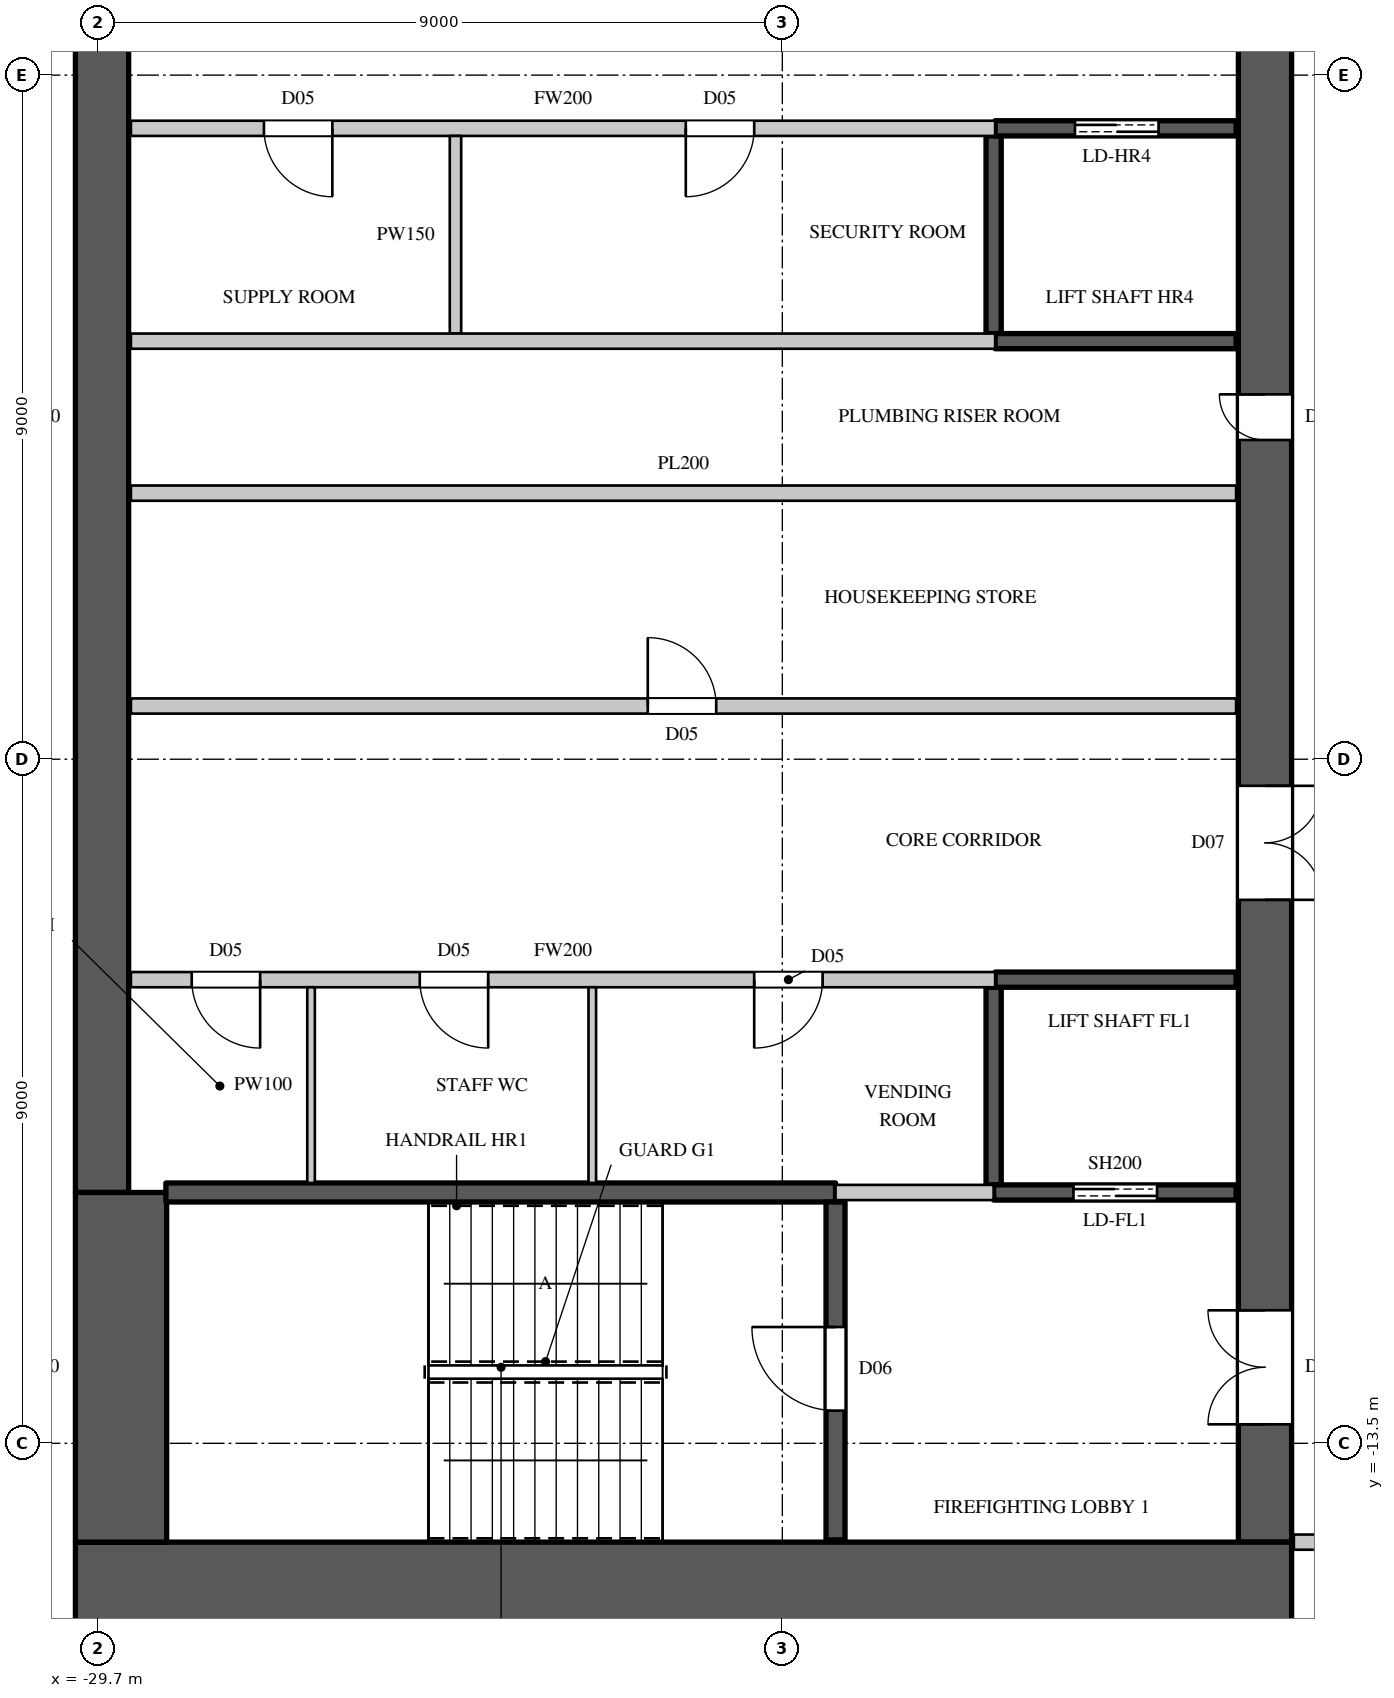
"""IFC4 building model, lengths in metres.
Left out: names, types, materials, properties, quantities, classifications, styles, units other than length and angle.
Written with IfcOpenShell. Run it as: python <this file> out.ifc"""

import sys

from ifc_helpers import new_model, si_unit, direction, frame, frame_2d, origin, place, context, subcontext, project, spatial, rectangle, extrude, element, fill, save


model = new_model("IFC4")
c1 = context("Model", 3, precision=1e-05, world=origin(), true_north=direction((0.0, 1.0)))
c2 = subcontext(c1, "Body", "Model", "MODEL_VIEW")
j1 = project(units=[si_unit("LENGTHUNIT", "METRE"), si_unit("PLANEANGLEUNIT", "RADIAN")], contexts=[c1])
p1 = place(None, origin())
s1 = spatial("IfcSite", under=j1, at=p1, CompositionType="ELEMENT")
p2 = place(p1, origin())
s2 = spatial("IfcBuilding", under=s1, at=p2, CompositionType="ELEMENT")
p3 = place(p2, frame((0.0, 0.0, 259.8)))
s3 = spatial("IfcBuildingStorey", under=s2, at=p3, CompositionType="ELEMENT", Elevation=259.8)
p4 = place(p3, frame((-30.0, -15.4, 0.0), z_axis=(0.0, 0.0, 1.0), x_axis=(1.0, 0.0, 0.0)))
e1 = element("IfcWall", 1, at=p4, inside=s3, PredefinedType="SHEAR", context=c2, shape_type="SweptSolid", body=[
    extrude(rectangle(XDim=16.0, YDim=1.2, at=frame_2d((8.0, 0.0))), origin(), (0.0, 0.0, 1.0), 4.1),
])
p5 = place(p3, frame((-14.35, -14.8, 0.0), z_axis=(0.0, 0.0, 1.0), x_axis=(0.0, 1.0, 0.0)))
e2 = element("IfcWall", 2, at=p5, inside=s3, PredefinedType="SHEAR", context=c2, shape_type="SweptSolid", body=[
    extrude(rectangle(XDim=29.6, YDim=0.7, at=frame_2d((14.8, 0.0))), origin(), (0.0, 0.0, 1.0), 4.1),
])
p6 = place(p5, frame((1.55, 0.0, 0.0)))
e3 = element("IfcOpeningElement", 3, at=p6, cuts=e2, PredefinedType="OPENING", context=c2, shape_type="SweptSolid", body=[
    extrude(rectangle(XDim=1.5, YDim=2.4, at=frame_2d((0.75, 1.2))), frame((0.0, 0.36, 0.0), z_axis=(0.0, -1.0, 0.0), x_axis=(1.0, 0.0, 0.0)), (0.0, 0.0, 1.0), 0.72),
])
p7 = place(p5, frame((26.55, 0.0, 0.0)))
e4 = element("IfcOpeningElement", 4, at=p7, cuts=e2, PredefinedType="OPENING", context=c2, shape_type="SweptSolid", body=[
    extrude(rectangle(XDim=1.5, YDim=2.4, at=frame_2d((0.75, 1.2))), frame((0.0, 0.36, 0.0), z_axis=(0.0, -1.0, 0.0), x_axis=(1.0, 0.0, 0.0)), (0.0, 0.0, 1.0), 0.72),
])
p8 = place(p5, frame((8.45, 0.0, 0.0)))
e5 = element("IfcOpeningElement", 5, at=p8, cuts=e2, PredefinedType="OPENING", context=c2, shape_type="SweptSolid", body=[
    extrude(rectangle(XDim=1.5, YDim=2.4, at=frame_2d((0.75, 1.2))), frame((0.0, 0.36, 0.0), z_axis=(0.0, -1.0, 0.0), x_axis=(1.0, 0.0, 0.0)), (0.0, 0.0, 1.0), 0.72),
])
p9 = place(p5, frame((19.65, 0.0, 0.0)))
e6 = element("IfcOpeningElement", 6, at=p9, cuts=e2, PredefinedType="OPENING", context=c2, shape_type="SweptSolid", body=[
    extrude(rectangle(XDim=1.5, YDim=2.4, at=frame_2d((0.75, 1.2))), frame((0.0, 0.36, 0.0), z_axis=(0.0, -1.0, 0.0), x_axis=(1.0, 0.0, 0.0)), (0.0, 0.0, 1.0), 0.72),
])
p10 = place(p5, frame((14.5, 0.0, 0.0)))
e7 = element("IfcOpeningElement", 7, at=p10, cuts=e2, PredefinedType="OPENING", context=c2, shape_type="SweptSolid", body=[
    extrude(rectangle(XDim=0.6, YDim=2.0, at=frame_2d((0.3, 1.0))), frame((0.0, 0.36, 0.0), z_axis=(0.0, -1.0, 0.0), x_axis=(1.0, 0.0, 0.0)), (0.0, 0.0, 1.0), 0.72),
])
p11 = place(p3, frame((-29.65, -10.2, 0.0), z_axis=(0.0, 0.0, 1.0), x_axis=(0.0, 1.0, 0.0)))
e8 = element("IfcWall", 8, at=p11, inside=s3, PredefinedType="SHEAR", context=c2, shape_type="SweptSolid", body=[
    extrude(rectangle(XDim=20.4, YDim=0.7, at=frame_2d((10.2, 0.0))), origin(), (0.0, 0.0, 1.0), 4.1),
])
p12 = place(p3, frame((-29.4, -14.8, 0.0), z_axis=(0.0, 0.0, 1.0), x_axis=(0.0, 1.0, 0.0)))
e9 = element("IfcWall", 9, at=p12, inside=s3, PredefinedType="SHEAR", context=c2, shape_type="SweptSolid", body=[
    extrude(rectangle(XDim=4.6, YDim=1.2, at=frame_2d((2.3, 0.0))), origin(), (0.0, 0.0, 1.0), 4.1),
])
p13 = place(p3, frame((-29.27, -7.4, 0.0), z_axis=(0.0, 0.0, 1.0), x_axis=(1.0, 0.0, 0.0)))
e10 = element("IfcWall", 10, at=p13, inside=s3, PredefinedType="PARTITIONING", context=c2, shape_type="SweptSolid", body=[
    extrude(rectangle(XDim=11.37, YDim=0.2, at=frame_2d((5.685, 0.0))), origin(), (0.0, 0.0, 1.0), 3.8),
])
p14 = place(p13, frame((0.8, 0.0, 0.0)))
e11 = element("IfcOpeningElement", 11, at=p14, cuts=e10, PredefinedType="OPENING", context=c2, shape_type="SweptSolid", body=[
    extrude(rectangle(XDim=0.9, YDim=2.2, at=frame_2d((0.45, 1.1))), frame((0.0, 0.11, 0.0), z_axis=(0.0, -1.0, 0.0), x_axis=(1.0, 0.0, 0.0)), (0.0, 0.0, 1.0), 0.22),
])
p15 = place(p13, frame((3.8, 0.0, 0.0)))
e12 = element("IfcOpeningElement", 12, at=p15, cuts=e10, PredefinedType="OPENING", context=c2, shape_type="SweptSolid", body=[
    extrude(rectangle(XDim=0.9, YDim=2.2, at=frame_2d((0.45, 1.1))), frame((0.0, 0.11, 0.0), z_axis=(0.0, -1.0, 0.0), x_axis=(1.0, 0.0, 0.0)), (0.0, 0.0, 1.0), 0.22),
])
p16 = place(p13, frame((8.2, 0.0, 0.0)))
e13 = element("IfcOpeningElement", 13, at=p16, cuts=e10, PredefinedType="OPENING", context=c2, shape_type="SweptSolid", body=[
    extrude(rectangle(XDim=0.9, YDim=2.2, at=frame_2d((0.45, 1.1))), frame((0.0, 0.11, 0.0), z_axis=(0.0, -1.0, 0.0), x_axis=(1.0, 0.0, 0.0)), (0.0, 0.0, 1.0), 0.22),
])
p17 = place(p3, frame((-29.27, -3.8, 0.0), z_axis=(0.0, 0.0, 1.0), x_axis=(1.0, 0.0, 0.0)))
e14 = element("IfcWall", 14, at=p17, inside=s3, PredefinedType="PARTITIONING", context=c2, shape_type="SweptSolid", body=[
    extrude(rectangle(XDim=14.54, YDim=0.2, at=frame_2d((7.27, 0.0))), origin(), (0.0, 0.0, 1.0), 3.8),
])
p18 = place(p17, frame((6.8, 0.0, 0.0)))
e15 = element("IfcOpeningElement", 15, at=p18, cuts=e14, PredefinedType="OPENING", context=c2, shape_type="SweptSolid", body=[
    extrude(rectangle(XDim=0.9, YDim=2.2, at=frame_2d((0.45, 1.1))), frame((0.0, 0.11, 0.0), z_axis=(0.0, -1.0, 0.0), x_axis=(1.0, 0.0, 0.0)), (0.0, 0.0, 1.0), 0.22),
])
p19 = place(p3, frame((-29.27, 3.8, 0.0), z_axis=(0.0, 0.0, 1.0), x_axis=(1.0, 0.0, 0.0)))
e16 = element("IfcWall", 16, at=p19, inside=s3, PredefinedType="PARTITIONING", context=c2, shape_type="SweptSolid", body=[
    extrude(rectangle(XDim=11.37, YDim=0.2, at=frame_2d((5.685, 0.0))), origin(), (0.0, 0.0, 1.0), 3.8),
])
p20 = place(p19, frame((1.75, 0.0, 0.0)))
e17 = element("IfcOpeningElement", 17, at=p20, cuts=e16, PredefinedType="OPENING", context=c2, shape_type="SweptSolid", body=[
    extrude(rectangle(XDim=0.9, YDim=2.2, at=frame_2d((0.45, 1.1))), frame((0.0, 0.11, 0.0), z_axis=(0.0, -1.0, 0.0), x_axis=(1.0, 0.0, 0.0)), (0.0, 0.0, 1.0), 0.22),
])
p21 = place(p19, frame((7.3, 0.0, 0.0)))
e18 = element("IfcOpeningElement", 18, at=p21, cuts=e16, PredefinedType="OPENING", context=c2, shape_type="SweptSolid", body=[
    extrude(rectangle(XDim=0.9, YDim=2.2, at=frame_2d((0.45, 1.1))), frame((0.0, 0.11, 0.0), z_axis=(0.0, -1.0, 0.0), x_axis=(1.0, 0.0, 0.0)), (0.0, 0.0, 1.0), 0.22),
])
p22 = place(p3, frame((-20.0, -10.2, 0.0), z_axis=(0.0, 0.0, 1.0), x_axis=(1.0, 0.0, 0.0)))
e19 = element("IfcWall", 19, at=p22, inside=s3, PredefinedType="PARTITIONING", context=c2, shape_type="SweptSolid", body=[
    extrude(rectangle(XDim=2.08, YDim=0.2, at=frame_2d((1.04, 0.0))), origin(), (0.0, 0.0, 1.0), 3.8),
])
p23 = place(p3, frame((-13.97, -14.8, 0.0), z_axis=(0.0, 0.0, 1.0), x_axis=(1.0, 0.0, 0.0)))
e20 = element("IfcWall", 20, at=p23, inside=s3, PredefinedType="PARTITIONING", context=c2, shape_type="SweptSolid", body=[
    extrude(rectangle(XDim=2.87, YDim=0.2, at=frame_2d((1.435, 0.0))), origin(), (0.0, 0.0, 1.0), 3.8),
])
p24 = place(p3, frame((-25.0, 1.1, 0.0), z_axis=(0.0, 0.0, 1.0), x_axis=(0.0, 1.0, 0.0)))
e21 = element("IfcWall", 21, at=p24, inside=s3, PredefinedType="PARTITIONING", context=c2, shape_type="SweptSolid", body=[
    extrude(rectangle(XDim=2.6, YDim=0.15, at=frame_2d((1.3, 0.0))), origin(), (0.0, 0.0, 1.0), 3.8),
])
p25 = place(p3, frame((-29.27, -1.0, 0.0), z_axis=(0.0, 0.0, 1.0), x_axis=(1.0, 0.0, 0.0)))
e22 = element("IfcWall", 22, at=p25, inside=s3, PredefinedType="PARTITIONING", context=c2, shape_type="SweptSolid", body=[
    extrude(rectangle(XDim=14.54, YDim=0.2, at=frame_2d((7.27, 0.0))), origin(), (0.0, 0.0, 1.0), 3.8),
])
p26 = place(p3, frame((-29.27, 1.0, 0.0), z_axis=(0.0, 0.0, 1.0), x_axis=(1.0, 0.0, 0.0)))
e23 = element("IfcWall", 23, at=p26, inside=s3, PredefinedType="PARTITIONING", context=c2, shape_type="SweptSolid", body=[
    extrude(rectangle(XDim=11.37, YDim=0.2, at=frame_2d((5.685, 0.0))), origin(), (0.0, 0.0, 1.0), 3.8),
])
p27 = place(p3, frame((-17.92, -10.1, 0.0), z_axis=(0.0, 0.0, 1.0), x_axis=(0.0, 1.0, 0.0)))
e24 = element("IfcWall", 24, at=p27, inside=s3, PredefinedType="SHEAR", context=c2, shape_type="SweptSolid", body=[
    extrude(rectangle(XDim=2.6, YDim=0.2, at=frame_2d((1.3, 0.0))), origin(), (0.0, 0.0, 1.0), 3.8),
])
p28 = place(p3, frame((-17.92, -10.2, 0.0), z_axis=(0.0, 0.0, 1.0), x_axis=(1.0, 0.0, 0.0)))
e25 = element("IfcWall", 25, at=p28, inside=s3, PredefinedType="SHEAR", context=c2, shape_type="SweptSolid", body=[
    extrude(rectangle(XDim=3.19, YDim=0.2, at=frame_2d((1.595, 0.0))), origin(), (0.0, 0.0, 1.0), 3.8),
])
p29 = place(p28, frame((1.05, 0.0, 0.0)))
e26 = element("IfcOpeningElement", 26, at=p29, cuts=e25, PredefinedType="OPENING", context=c2, shape_type="SweptSolid", body=[
    extrude(rectangle(XDim=1.1, YDim=2.2, at=frame_2d((0.55, 1.1))), frame((0.0, 0.11, 0.0), z_axis=(0.0, -1.0, 0.0), x_axis=(1.0, 0.0, 0.0)), (0.0, 0.0, 1.0), 0.22),
])
p30 = place(p3, frame((-17.9, -7.4, 0.0), z_axis=(0.0, 0.0, 1.0), x_axis=(1.0, 0.0, 0.0)))
e27 = element("IfcWall", 27, at=p30, inside=s3, PredefinedType="SHEAR", context=c2, shape_type="SweptSolid", body=[
    extrude(rectangle(XDim=3.17, YDim=0.2, at=frame_2d((1.585, 0.0))), origin(), (0.0, 0.0, 1.0), 3.8),
])
p31 = place(p3, frame((-17.92, 1.1, 0.0), z_axis=(0.0, 0.0, 1.0), x_axis=(0.0, 1.0, 0.0)))
e28 = element("IfcWall", 28, at=p31, inside=s3, PredefinedType="SHEAR", context=c2, shape_type="SweptSolid", body=[
    extrude(rectangle(XDim=2.6, YDim=0.2, at=frame_2d((1.3, 0.0))), origin(), (0.0, 0.0, 1.0), 3.8),
])
p32 = place(p3, frame((-17.9, 1.0, 0.0), z_axis=(0.0, 0.0, 1.0), x_axis=(1.0, 0.0, 0.0)))
e29 = element("IfcWall", 29, at=p32, inside=s3, PredefinedType="SHEAR", context=c2, shape_type="SweptSolid", body=[
    extrude(rectangle(XDim=3.17, YDim=0.2, at=frame_2d((1.585, 0.0))), origin(), (0.0, 0.0, 1.0), 3.8),
])
p33 = place(p3, frame((-17.9, 3.8, 0.0), z_axis=(0.0, 0.0, 1.0), x_axis=(1.0, 0.0, 0.0)))
e30 = element("IfcWall", 30, at=p33, inside=s3, PredefinedType="SHEAR", context=c2, shape_type="SweptSolid", body=[
    extrude(rectangle(XDim=3.17, YDim=0.2, at=frame_2d((1.585, 0.0))), origin(), (0.0, 0.0, 1.0), 3.8),
])
p34 = place(p33, frame((1.05, 0.0, 0.0)))
e31 = element("IfcOpeningElement", 31, at=p34, cuts=e30, PredefinedType="OPENING", context=c2, shape_type="SweptSolid", body=[
    extrude(rectangle(XDim=1.1, YDim=2.2, at=frame_2d((0.55, 1.1))), frame((0.0, 0.11, 0.0), z_axis=(0.0, -1.0, 0.0), x_axis=(1.0, 0.0, 0.0)), (0.0, 0.0, 1.0), 0.22),
])
p35 = place(p3, frame((-28.81, -10.2, 0.0), z_axis=(0.0, 0.0, 1.0), x_axis=(1.0, 0.0, 0.0)))
e32 = element("IfcWall", 32, at=p35, inside=s3, PredefinedType="SHEAR", context=c2, shape_type="SweptSolid", body=[
    extrude(rectangle(XDim=8.81, YDim=0.25, at=frame_2d((4.405, 0.0))), origin(), (0.0, 0.0, 1.0), 3.8),
])
p36 = place(p3, frame((-20.0, -14.77, 0.0), z_axis=(0.0, 0.0, 1.0), x_axis=(0.0, 1.0, 0.0)))
e33 = element("IfcWall", 33, at=p36, inside=s3, PredefinedType="SHEAR", context=c2, shape_type="SweptSolid", body=[
    extrude(rectangle(XDim=4.445, YDim=0.25, at=frame_2d((2.223, 0.0))), origin(), (0.0, 0.0, 1.0), 3.8),
])
p37 = place(p36, frame((1.7, 0.0, 0.0)))
e34 = element("IfcOpeningElement", 34, at=p37, cuts=e33, PredefinedType="OPENING", context=c2, shape_type="SweptSolid", body=[
    extrude(rectangle(XDim=1.1, YDim=2.2, at=frame_2d((0.55, 1.1))), frame((0.0, 0.135, 0.0), z_axis=(0.0, -1.0, 0.0), x_axis=(1.0, 0.0, 0.0)), (0.0, 0.0, 1.0), 0.27),
])
for number, where, z_axis, x_axis in (
    (35, (-26.9, -10.075, 0.0), (0.0, 0.0, 1.0), (0.0, 1.0, 0.0)),
    (36, (-23.2, -10.075, 0.0), (0.0, 0.0, 1.0), (0.0, 1.0, 0.0)),
):
    element("IfcWall", number, at=place(p3, frame(where, z_axis=z_axis, x_axis=x_axis)), inside=s3, PredefinedType="PARTITIONING", context=c2, shape_type="SweptSolid", body=[
        extrude(rectangle(XDim=2.575, YDim=0.1, at=frame_2d((1.288, 0.0))), origin(), (0.0, 0.0, 1.0), 3.8),
    ])
p38 = place(p37, origin())
e37 = element("IfcDoor", 37, at=p38, inside=s3, OperationType="SINGLE_SWING_RIGHT", PredefinedType="DOOR", context=c2, shape_type="SweptSolid", body=[
    extrude(rectangle(XDim=1.1, YDim=2.2, at=frame_2d((0.55, 1.1))), frame((0.0, 0.025, 0.0), z_axis=(0.0, -1.0, 0.0), x_axis=(1.0, 0.0, 0.0)), (0.0, 0.0, 1.0), 0.05),
])
fill(e34, e37)
p39 = place(p14, origin())
e38 = element("IfcDoor", 38, at=p39, inside=s3, OperationType="SINGLE_SWING_LEFT", PredefinedType="DOOR", context=c2, shape_type="SweptSolid", body=[
    extrude(rectangle(XDim=0.9, YDim=2.2, at=frame_2d((0.45, 1.1))), frame((0.0, 0.025, 0.0), z_axis=(0.0, -1.0, 0.0), x_axis=(1.0, 0.0, 0.0)), (0.0, 0.0, 1.0), 0.05),
])
fill(e11, e38)
p40 = place(p15, origin())
e39 = element("IfcDoor", 39, at=p40, inside=s3, OperationType="SINGLE_SWING_LEFT", PredefinedType="DOOR", context=c2, shape_type="SweptSolid", body=[
    extrude(rectangle(XDim=0.9, YDim=2.2, at=frame_2d((0.45, 1.1))), frame((0.0, 0.025, 0.0), z_axis=(0.0, -1.0, 0.0), x_axis=(1.0, 0.0, 0.0)), (0.0, 0.0, 1.0), 0.05),
])
fill(e12, e39)
p41 = place(p16, origin())
e40 = element("IfcDoor", 40, at=p41, inside=s3, OperationType="SINGLE_SWING_RIGHT", PredefinedType="DOOR", context=c2, shape_type="SweptSolid", body=[
    extrude(rectangle(XDim=0.9, YDim=2.2, at=frame_2d((0.45, 1.1))), frame((0.0, 0.025, 0.0), z_axis=(0.0, -1.0, 0.0), x_axis=(1.0, 0.0, 0.0)), (0.0, 0.0, 1.0), 0.05),
])
fill(e13, e40)
p42 = place(p18, origin())
e41 = element("IfcDoor", 41, at=p42, inside=s3, OperationType="SINGLE_SWING_LEFT", PredefinedType="DOOR", context=c2, shape_type="SweptSolid", body=[
    extrude(rectangle(XDim=0.9, YDim=2.2, at=frame_2d((0.45, 1.1))), frame((0.0, 0.025, 0.0), z_axis=(0.0, -1.0, 0.0), x_axis=(1.0, 0.0, 0.0)), (0.0, 0.0, 1.0), 0.05),
])
fill(e15, e41)
p43 = place(p20, origin())
e42 = element("IfcDoor", 42, at=p43, inside=s3, OperationType="SINGLE_SWING_LEFT", PredefinedType="DOOR", context=c2, shape_type="SweptSolid", body=[
    extrude(rectangle(XDim=0.9, YDim=2.2, at=frame_2d((0.45, 1.1))), frame((0.0, 0.025, 0.0), z_axis=(0.0, -1.0, 0.0), x_axis=(1.0, 0.0, 0.0)), (0.0, 0.0, 1.0), 0.05),
])
fill(e17, e42)
p44 = place(p21, origin())
e43 = element("IfcDoor", 43, at=p44, inside=s3, OperationType="SINGLE_SWING_RIGHT", PredefinedType="DOOR", context=c2, shape_type="SweptSolid", body=[
    extrude(rectangle(XDim=0.9, YDim=2.2, at=frame_2d((0.45, 1.1))), frame((0.0, 0.025, 0.0), z_axis=(0.0, -1.0, 0.0), x_axis=(1.0, 0.0, 0.0)), (0.0, 0.0, 1.0), 0.05),
])
fill(e18, e43)
p45 = place(p29, origin())
e44 = element("IfcDoor", 44, at=p45, inside=s3, OperationType="DOUBLE_DOOR_SLIDING", PredefinedType="DOOR", context=c2, shape_type="SweptSolid", body=[
    extrude(rectangle(XDim=1.1, YDim=2.2, at=frame_2d((0.55, 1.1))), frame((0.0, 0.025, 0.0), z_axis=(0.0, -1.0, 0.0), x_axis=(1.0, 0.0, 0.0)), (0.0, 0.0, 1.0), 0.05),
])
fill(e26, e44)
p46 = place(p34, origin())
e45 = element("IfcDoor", 45, at=p46, inside=s3, OperationType="DOUBLE_DOOR_SLIDING", PredefinedType="DOOR", context=c2, shape_type="SweptSolid", body=[
    extrude(rectangle(XDim=1.1, YDim=2.2, at=frame_2d((0.55, 1.1))), frame((0.0, 0.025, 0.0), z_axis=(0.0, -1.0, 0.0), x_axis=(1.0, 0.0, 0.0)), (0.0, 0.0, 1.0), 0.05),
])
fill(e31, e45)
p47 = place(p6, origin())
e46 = element("IfcDoor", 46, at=p47, inside=s3, OperationType="DOUBLE_DOOR_SINGLE_SWING", PredefinedType="DOOR", context=c2, shape_type="SweptSolid", body=[
    extrude(rectangle(XDim=1.5, YDim=2.4, at=frame_2d((0.75, 1.2))), frame((0.0, 0.345, 0.0), z_axis=(0.0, -1.0, 0.0), x_axis=(1.0, 0.0, 0.0)), (0.0, 0.0, 1.0), 0.05),
])
fill(e3, e46)
p48 = place(p8, origin())
e47 = element("IfcDoor", 47, at=p48, inside=s3, OperationType="DOUBLE_DOOR_SINGLE_SWING", PredefinedType="DOOR", context=c2, shape_type="SweptSolid", body=[
    extrude(rectangle(XDim=1.5, YDim=2.4, at=frame_2d((0.75, 1.2))), frame((0.0, -0.295, 0.0), z_axis=(0.0, -1.0, 0.0), x_axis=(1.0, 0.0, 0.0)), (0.0, 0.0, 1.0), 0.05),
])
fill(e5, e47)
p49 = place(p10, origin())
e48 = element("IfcDoor", 48, at=p49, inside=s3, OperationType="SINGLE_SWING_RIGHT", PredefinedType="DOOR", context=c2, shape_type="SweptSolid", body=[
    extrude(rectangle(XDim=0.6, YDim=2.0, at=frame_2d((0.3, 1.0))), frame((0.0, 0.345, 0.0), z_axis=(0.0, -1.0, 0.0), x_axis=(1.0, 0.0, 0.0)), (0.0, 0.0, 1.0), 0.05),
])
fill(e7, e48)
save(model, sys.argv[1])
